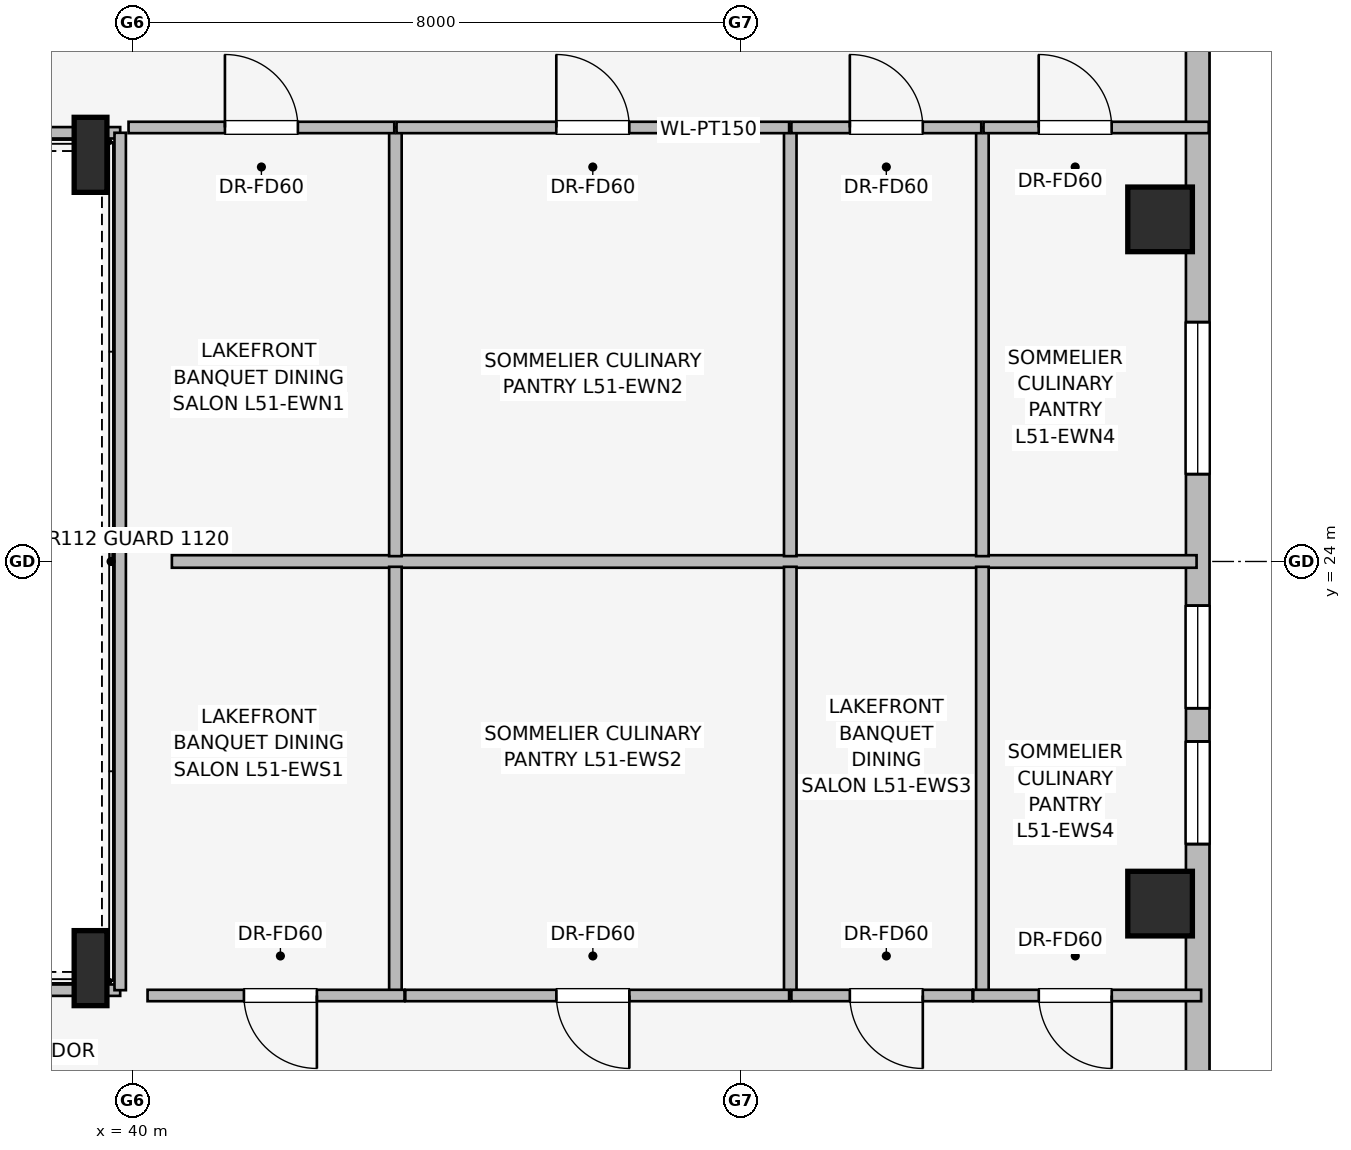
"""IFC4 building model, lengths in metres.
Left out: names, types, materials, properties, quantities, classifications, styles, units other than length and angle.
Written with IfcOpenShell. Run it as: python <this file> out.ifc"""

import sys

from ifc_helpers import new_model, si_unit, direction, frame, frame_2d, origin, origin_2d, place, context, subcontext, project, spatial, rectangle, i_section, extrude, element, fill, save


model = new_model("IFC4")
c1 = context("Model", 3, precision=1e-05, world=origin(), true_north=direction((0.0, 1.0)))
c2 = subcontext(c1, "Body", "Model", "MODEL_VIEW")
j1 = project(units=[si_unit("LENGTHUNIT", "METRE"), si_unit("PLANEANGLEUNIT", "RADIAN")], contexts=[c1])
p1 = place(None, origin())
s1 = spatial("IfcSite", under=j1, at=p1, CompositionType="ELEMENT")
p2 = place(p1, origin())
s2 = spatial("IfcBuilding", under=s1, at=p2, CompositionType="ELEMENT")
p3 = place(p2, frame((0.0, 0.0, 187.8)))
s3 = spatial("IfcBuildingStorey", under=s2, at=p3, CompositionType="ELEMENT", Elevation=187.8)
for number, where, z_axis, x_axis in (
    (1, (53.522, 19.499, 0.0), (0.0, 0.0, 1.0), (1.0, 0.0, 0.0)),
    (2, (53.522, 28.501, 0.0), (0.0, 0.0, 1.0), (1.0, 0.0, 0.0)),
):
    element("IfcColumn", number, at=place(p3, frame(where, z_axis=z_axis, x_axis=x_axis)), inside=s3, PredefinedType="COLUMN", context=c2, shape_type="SweptSolid", body=[
        extrude(rectangle(XDim=0.85, YDim=0.85, at=origin_2d()), origin(), (0.0, 0.0, 1.0), 3.45),
    ])
for number, where, z_axis, x_axis in (
    (3, (39.45, 18.65, 0.0), (0.0, 0.0, 1.0), (1.0, 0.0, 0.0)),
    (4, (39.45, 29.35, 0.0), (0.0, 0.0, 1.0), (1.0, 0.0, 0.0)),
):
    element("IfcColumn", number, at=place(p3, frame(where, z_axis=z_axis, x_axis=x_axis)), inside=s3, PredefinedType="COLUMN", context=c2, shape_type="SweptSolid", body=[
        extrude(i_section(OverallWidth=0.431, OverallDepth=0.987, WebThickness=0.034, FlangeThickness=0.062, at=origin_2d()), origin(), (0.0, 0.0, 1.0), 3.45),
    ])
p4 = place(p3, frame((54.017, 31.502, 0.0), z_axis=(0.0, 0.0, 1.0), x_axis=(0.0, -1.0, 0.0)))
e5 = element("IfcWall", 5, at=p4, inside=s3, PredefinedType="STANDARD", context=c2, shape_type="SweptSolid", body=[
    extrude(rectangle(XDim=15.004, YDim=0.31, at=frame_2d((7.502, 0.0))), origin(), (0.0, 0.0, 1.0), 3.14),
])
p5 = place(p4, frame((4.353, 0.0, 0.75)))
e6 = element("IfcOpeningElement", 6, at=p5, cuts=e5, PredefinedType="OPENING", context=c2, shape_type="SweptSolid", body=[
    extrude(rectangle(XDim=2.0, YDim=1.5, at=frame_2d((1.0, 0.75))), frame((0.0, 0.165, 0.0), z_axis=(0.0, -1.0, 0.0), x_axis=(1.0, 0.0, 0.0)), (0.0, 0.0, 1.0), 0.33),
])
p6 = place(p4, frame((8.083, 0.0, 0.75)))
e7 = element("IfcOpeningElement", 7, at=p6, cuts=e5, PredefinedType="OPENING", context=c2, shape_type="SweptSolid", body=[
    extrude(rectangle(XDim=1.35, YDim=1.45, at=frame_2d((0.675, 0.725))), frame((0.0, 0.165, 0.0), z_axis=(0.0, -1.0, 0.0), x_axis=(1.0, 0.0, 0.0)), (0.0, 0.0, 1.0), 0.33),
])
p7 = place(p4, frame((9.87, 0.0, 0.75)))
e8 = element("IfcOpeningElement", 8, at=p7, cuts=e5, PredefinedType="OPENING", context=c2, shape_type="SweptSolid", body=[
    extrude(rectangle(XDim=1.35, YDim=1.45, at=frame_2d((0.675, 0.725))), frame((0.0, 0.165, 0.0), z_axis=(0.0, -1.0, 0.0), x_axis=(1.0, 0.0, 0.0)), (0.0, 0.0, 1.0), 0.33),
])
p8 = place(p3, frame((27.675, 18.36, 0.0), z_axis=(0.0, 0.0, 1.0), x_axis=(1.0, 0.0, 0.0)))
e9 = element("IfcWall", 9, at=p8, inside=s3, PredefinedType="PARTITIONING", context=c2, shape_type="SweptSolid", body=[
    extrude(rectangle(XDim=12.165, YDim=0.15, at=frame_2d((6.083, 0.0))), origin(), (0.0, 0.0, 1.0), 2.281),
])
p9 = place(p3, frame((39.84, 29.64, 0.0), z_axis=(0.0, 0.0, 1.0), x_axis=(-1.0, 0.0, 0.0)))
e10 = element("IfcWall", 10, at=p9, inside=s3, PredefinedType="PARTITIONING", context=c2, shape_type="SweptSolid", body=[
    extrude(rectangle(XDim=12.2, YDim=0.15, at=frame_2d((6.1, 0.0))), origin(), (0.0, 0.0, 1.0), 2.281),
])
p10 = place(p3, frame((39.84, 18.36, 0.0), z_axis=(0.0, 0.0, 1.0), x_axis=(0.0, 1.0, 0.0)))
e11 = element("IfcWall", 11, at=p10, inside=s3, PredefinedType="PARTITIONING", context=c2, shape_type="SweptSolid", body=[
    extrude(rectangle(XDim=11.28, YDim=0.15, at=frame_2d((5.64, 0.0))), origin(), (0.0, 0.0, 1.0), 3.14),
])
p11 = place(p3, frame((40.52, 24.0, 0.0), z_axis=(0.0, 0.0, 1.0), x_axis=(1.0, 0.0, 0.0)))
e12 = element("IfcWall", 12, at=p11, inside=s3, PredefinedType="PARTITIONING", context=c2, shape_type="SweptSolid", body=[
    extrude(rectangle(XDim=13.482, YDim=0.165, at=frame_2d((6.741, 0.0))), origin(), (0.0, 0.0, 1.0), 3.14),
])
for number, where, z_axis, x_axis in (
    (13, (43.461, 24.07, 0.0), (0.0, 0.0, 1.0), (0.0, 1.0, 0.0)),
    (14, (48.656, 24.07, 0.0), (0.0, 0.0, 1.0), (0.0, 1.0, 0.0)),
    (15, (51.184, 24.07, 0.0), (0.0, 0.0, 1.0), (0.0, 1.0, 0.0)),
):
    element("IfcWall", number, at=place(p3, frame(where, z_axis=z_axis, x_axis=x_axis)), inside=s3, PredefinedType="PARTITIONING", context=c2, shape_type="SweptSolid", body=[
        extrude(rectangle(XDim=5.64, YDim=0.165, at=frame_2d((2.82, 0.0))), origin(), (0.0, 0.0, 1.0), 3.14),
    ])
p12 = place(p3, frame((39.95, 29.71, 0.0), z_axis=(0.0, 0.0, 1.0), x_axis=(1.0, 0.0, 0.0)))
e16 = element("IfcWall", 16, at=p12, inside=s3, PredefinedType="PARTITIONING", context=c2, shape_type="SweptSolid", body=[
    extrude(rectangle(XDim=3.496, YDim=0.15, at=frame_2d((1.748, 0.0))), origin(), (0.0, 0.0, 1.0), 3.14),
])
p13 = place(p12, frame((1.268, 0.0, 0.0)))
e17 = element("IfcOpeningElement", 17, at=p13, cuts=e16, PredefinedType="OPENING", context=c2, shape_type="SweptSolid", body=[
    extrude(rectangle(XDim=0.96, YDim=2.0, at=frame_2d((0.48, 1.0))), frame((0.0, 0.085, 0.0), z_axis=(0.0, -1.0, 0.0), x_axis=(1.0, 0.0, 0.0)), (0.0, 0.0, 1.0), 0.17),
])
p14 = place(p3, frame((43.476, 29.71, 0.0), z_axis=(0.0, 0.0, 1.0), x_axis=(1.0, 0.0, 0.0)))
e18 = element("IfcWall", 18, at=p14, inside=s3, PredefinedType="PARTITIONING", context=c2, shape_type="SweptSolid", body=[
    extrude(rectangle(XDim=5.165, YDim=0.15, at=frame_2d((2.583, 0.0))), origin(), (0.0, 0.0, 1.0), 3.14),
])
p15 = place(p14, frame((2.102, 0.0, 0.0)))
e19 = element("IfcOpeningElement", 19, at=p15, cuts=e18, PredefinedType="OPENING", context=c2, shape_type="SweptSolid", body=[
    extrude(rectangle(XDim=0.96, YDim=2.0, at=frame_2d((0.48, 1.0))), frame((0.0, 0.085, 0.0), z_axis=(0.0, -1.0, 0.0), x_axis=(1.0, 0.0, 0.0)), (0.0, 0.0, 1.0), 0.17),
])
p16 = place(p3, frame((48.671, 29.71, 0.0), z_axis=(0.0, 0.0, 1.0), x_axis=(1.0, 0.0, 0.0)))
e20 = element("IfcWall", 20, at=p16, inside=s3, PredefinedType="PARTITIONING", context=c2, shape_type="SweptSolid", body=[
    extrude(rectangle(XDim=2.498, YDim=0.15, at=frame_2d((1.249, 0.0))), origin(), (0.0, 0.0, 1.0), 3.14),
])
p17 = place(p16, frame((0.769, 0.0, 0.0)))
e21 = element("IfcOpeningElement", 21, at=p17, cuts=e20, PredefinedType="OPENING", context=c2, shape_type="SweptSolid", body=[
    extrude(rectangle(XDim=0.96, YDim=2.0, at=frame_2d((0.48, 1.0))), frame((0.0, 0.085, 0.0), z_axis=(0.0, -1.0, 0.0), x_axis=(1.0, 0.0, 0.0)), (0.0, 0.0, 1.0), 0.17),
])
p18 = place(p3, frame((51.199, 29.71, 0.0), z_axis=(0.0, 0.0, 1.0), x_axis=(1.0, 0.0, 0.0)))
e22 = element("IfcWall", 22, at=p18, inside=s3, PredefinedType="PARTITIONING", context=c2, shape_type="SweptSolid", body=[
    extrude(rectangle(XDim=2.963, YDim=0.15, at=frame_2d((1.481, 0.0))), origin(), (0.0, 0.0, 1.0), 3.14),
])
p19 = place(p18, frame((0.726, 0.0, 0.0)))
e23 = element("IfcOpeningElement", 23, at=p19, cuts=e22, PredefinedType="OPENING", context=c2, shape_type="SweptSolid", body=[
    extrude(rectangle(XDim=0.96, YDim=2.0, at=frame_2d((0.48, 1.0))), frame((0.0, 0.085, 0.0), z_axis=(0.0, -1.0, 0.0), x_axis=(1.0, 0.0, 0.0)), (0.0, 0.0, 1.0), 0.17),
])
for number, where, z_axis, x_axis in (
    (24, (43.461, 18.29, 0.0), (0.0, 0.0, 1.0), (0.0, 1.0, 0.0)),
    (25, (48.656, 18.29, 0.0), (0.0, 0.0, 1.0), (0.0, 1.0, 0.0)),
    (26, (51.184, 18.29, 0.0), (0.0, 0.0, 1.0), (0.0, 1.0, 0.0)),
):
    element("IfcWall", number, at=place(p3, frame(where, z_axis=z_axis, x_axis=x_axis)), inside=s3, PredefinedType="PARTITIONING", context=c2, shape_type="SweptSolid", body=[
        extrude(rectangle(XDim=5.64, YDim=0.165, at=frame_2d((2.82, 0.0))), origin(), (0.0, 0.0, 1.0), 3.14),
    ])
p20 = place(p3, frame((43.581, 18.29, 0.0), z_axis=(0.0, 0.0, 1.0), x_axis=(-1.0, 0.0, 0.0)))
e27 = element("IfcWall", 27, at=p20, inside=s3, PredefinedType="PARTITIONING", context=c2, shape_type="SweptSolid", body=[
    extrude(rectangle(XDim=3.381, YDim=0.15, at=frame_2d((1.69, 0.0))), origin(), (0.0, 0.0, 1.0), 3.14),
])
p21 = place(p20, frame((1.153, 0.0, 0.0)))
e28 = element("IfcOpeningElement", 28, at=p21, cuts=e27, PredefinedType="OPENING", context=c2, shape_type="SweptSolid", body=[
    extrude(rectangle(XDim=0.96, YDim=2.0, at=frame_2d((0.48, 1.0))), frame((0.0, 0.085, 0.0), z_axis=(0.0, -1.0, 0.0), x_axis=(1.0, 0.0, 0.0)), (0.0, 0.0, 1.0), 0.17),
])
p22 = place(p3, frame((48.641, 18.29, 0.0), z_axis=(0.0, 0.0, 1.0), x_axis=(-1.0, 0.0, 0.0)))
e29 = element("IfcWall", 29, at=p22, inside=s3, PredefinedType="PARTITIONING", context=c2, shape_type="SweptSolid", body=[
    extrude(rectangle(XDim=5.05, YDim=0.15, at=frame_2d((2.525, 0.0))), origin(), (0.0, 0.0, 1.0), 3.14),
])
p23 = place(p22, frame((2.102, 0.0, 0.0)))
e30 = element("IfcOpeningElement", 30, at=p23, cuts=e29, PredefinedType="OPENING", context=c2, shape_type="SweptSolid", body=[
    extrude(rectangle(XDim=0.96, YDim=2.0, at=frame_2d((0.48, 1.0))), frame((0.0, 0.085, 0.0), z_axis=(0.0, -1.0, 0.0), x_axis=(1.0, 0.0, 0.0)), (0.0, 0.0, 1.0), 0.17),
])
p24 = place(p3, frame((51.054, 18.29, 0.0), z_axis=(0.0, 0.0, 1.0), x_axis=(-1.0, 0.0, 0.0)))
e31 = element("IfcWall", 31, at=p24, inside=s3, PredefinedType="PARTITIONING", context=c2, shape_type="SweptSolid", body=[
    extrude(rectangle(XDim=2.383, YDim=0.15, at=frame_2d((1.191, 0.0))), origin(), (0.0, 0.0, 1.0), 3.14),
])
p25 = place(p24, frame((0.654, 0.0, 0.0)))
e32 = element("IfcOpeningElement", 32, at=p25, cuts=e31, PredefinedType="OPENING", context=c2, shape_type="SweptSolid", body=[
    extrude(rectangle(XDim=0.96, YDim=2.0, at=frame_2d((0.48, 1.0))), frame((0.0, 0.085, 0.0), z_axis=(0.0, -1.0, 0.0), x_axis=(1.0, 0.0, 0.0)), (0.0, 0.0, 1.0), 0.17),
])
p26 = place(p3, frame((54.062, 18.29, 0.0), z_axis=(0.0, 0.0, 1.0), x_axis=(-1.0, 0.0, 0.0)))
e33 = element("IfcWall", 33, at=p26, inside=s3, PredefinedType="PARTITIONING", context=c2, shape_type="SweptSolid", body=[
    extrude(rectangle(XDim=2.998, YDim=0.15, at=frame_2d((1.499, 0.0))), origin(), (0.0, 0.0, 1.0), 3.14),
])
p27 = place(p26, frame((1.176, 0.0, 0.0)))
e34 = element("IfcOpeningElement", 34, at=p27, cuts=e33, PredefinedType="OPENING", context=c2, shape_type="SweptSolid", body=[
    extrude(rectangle(XDim=0.96, YDim=2.0, at=frame_2d((0.48, 1.0))), frame((0.0, 0.085, 0.0), z_axis=(0.0, -1.0, 0.0), x_axis=(1.0, 0.0, 0.0)), (0.0, 0.0, 1.0), 0.17),
])
p28 = place(p5, origin())
e35 = element("IfcWindow", 35, at=p28, inside=s3, PartitioningType="SINGLE_PANEL", PredefinedType="WINDOW", context=c2, shape_type="SweptSolid", body=[
    extrude(rectangle(XDim=2.0, YDim=1.5, at=frame_2d((1.0, 0.75))), frame((0.0, 0.03, 0.0), z_axis=(0.0, -1.0, 0.0), x_axis=(1.0, 0.0, 0.0)), (0.0, 0.0, 1.0), 0.06),
])
fill(e6, e35)
p29 = place(p6, origin())
e36 = element("IfcWindow", 36, at=p29, inside=s3, PartitioningType="SINGLE_PANEL", PredefinedType="WINDOW", context=c2, shape_type="SweptSolid", body=[
    extrude(rectangle(XDim=1.35, YDim=1.45, at=frame_2d((0.675, 0.725))), frame((0.0, 0.03, 0.0), z_axis=(0.0, -1.0, 0.0), x_axis=(1.0, 0.0, 0.0)), (0.0, 0.0, 1.0), 0.06),
])
fill(e7, e36)
p30 = place(p7, origin())
e37 = element("IfcWindow", 37, at=p30, inside=s3, PartitioningType="SINGLE_PANEL", PredefinedType="WINDOW", context=c2, shape_type="SweptSolid", body=[
    extrude(rectangle(XDim=1.35, YDim=1.45, at=frame_2d((0.675, 0.725))), frame((0.0, 0.03, 0.0), z_axis=(0.0, -1.0, 0.0), x_axis=(1.0, 0.0, 0.0)), (0.0, 0.0, 1.0), 0.06),
])
fill(e8, e37)
p31 = place(p13, origin())
e38 = element("IfcDoor", 38, at=p31, inside=s3, OperationType="SINGLE_SWING_LEFT", PredefinedType="DOOR", context=c2, shape_type="SweptSolid", body=[
    extrude(rectangle(XDim=0.96, YDim=2.0, at=frame_2d((0.48, 1.0))), frame((0.0, 0.025, 0.0), z_axis=(0.0, -1.0, 0.0), x_axis=(1.0, 0.0, 0.0)), (0.0, 0.0, 1.0), 0.05),
])
fill(e17, e38)
p32 = place(p15, origin())
e39 = element("IfcDoor", 39, at=p32, inside=s3, OperationType="SINGLE_SWING_LEFT", PredefinedType="DOOR", context=c2, shape_type="SweptSolid", body=[
    extrude(rectangle(XDim=0.96, YDim=2.0, at=frame_2d((0.48, 1.0))), frame((0.0, 0.025, 0.0), z_axis=(0.0, -1.0, 0.0), x_axis=(1.0, 0.0, 0.0)), (0.0, 0.0, 1.0), 0.05),
])
fill(e19, e39)
p33 = place(p17, origin())
e40 = element("IfcDoor", 40, at=p33, inside=s3, OperationType="SINGLE_SWING_LEFT", PredefinedType="DOOR", context=c2, shape_type="SweptSolid", body=[
    extrude(rectangle(XDim=0.96, YDim=2.0, at=frame_2d((0.48, 1.0))), frame((0.0, 0.025, 0.0), z_axis=(0.0, -1.0, 0.0), x_axis=(1.0, 0.0, 0.0)), (0.0, 0.0, 1.0), 0.05),
])
fill(e21, e40)
p34 = place(p19, origin())
e41 = element("IfcDoor", 41, at=p34, inside=s3, OperationType="SINGLE_SWING_LEFT", PredefinedType="DOOR", context=c2, shape_type="SweptSolid", body=[
    extrude(rectangle(XDim=0.96, YDim=2.0, at=frame_2d((0.48, 1.0))), frame((0.0, 0.025, 0.0), z_axis=(0.0, -1.0, 0.0), x_axis=(1.0, 0.0, 0.0)), (0.0, 0.0, 1.0), 0.05),
])
fill(e23, e41)
p35 = place(p21, origin())
e42 = element("IfcDoor", 42, at=p35, inside=s3, OperationType="SINGLE_SWING_LEFT", PredefinedType="DOOR", context=c2, shape_type="SweptSolid", body=[
    extrude(rectangle(XDim=0.96, YDim=2.0, at=frame_2d((0.48, 1.0))), frame((0.0, 0.025, 0.0), z_axis=(0.0, -1.0, 0.0), x_axis=(1.0, 0.0, 0.0)), (0.0, 0.0, 1.0), 0.05),
])
fill(e28, e42)
p36 = place(p23, origin())
e43 = element("IfcDoor", 43, at=p36, inside=s3, OperationType="SINGLE_SWING_LEFT", PredefinedType="DOOR", context=c2, shape_type="SweptSolid", body=[
    extrude(rectangle(XDim=0.96, YDim=2.0, at=frame_2d((0.48, 1.0))), frame((0.0, 0.025, 0.0), z_axis=(0.0, -1.0, 0.0), x_axis=(1.0, 0.0, 0.0)), (0.0, 0.0, 1.0), 0.05),
])
fill(e30, e43)
p37 = place(p25, origin())
e44 = element("IfcDoor", 44, at=p37, inside=s3, OperationType="SINGLE_SWING_LEFT", PredefinedType="DOOR", context=c2, shape_type="SweptSolid", body=[
    extrude(rectangle(XDim=0.96, YDim=2.0, at=frame_2d((0.48, 1.0))), frame((0.0, 0.025, 0.0), z_axis=(0.0, -1.0, 0.0), x_axis=(1.0, 0.0, 0.0)), (0.0, 0.0, 1.0), 0.05),
])
fill(e32, e44)
p38 = place(p27, origin())
e45 = element("IfcDoor", 45, at=p38, inside=s3, OperationType="SINGLE_SWING_LEFT", PredefinedType="DOOR", context=c2, shape_type="SweptSolid", body=[
    extrude(rectangle(XDim=0.96, YDim=2.0, at=frame_2d((0.48, 1.0))), frame((0.0, 0.025, 0.0), z_axis=(0.0, -1.0, 0.0), x_axis=(1.0, 0.0, 0.0)), (0.0, 0.0, 1.0), 0.05),
])
fill(e34, e45)
save(model, sys.argv[1])
